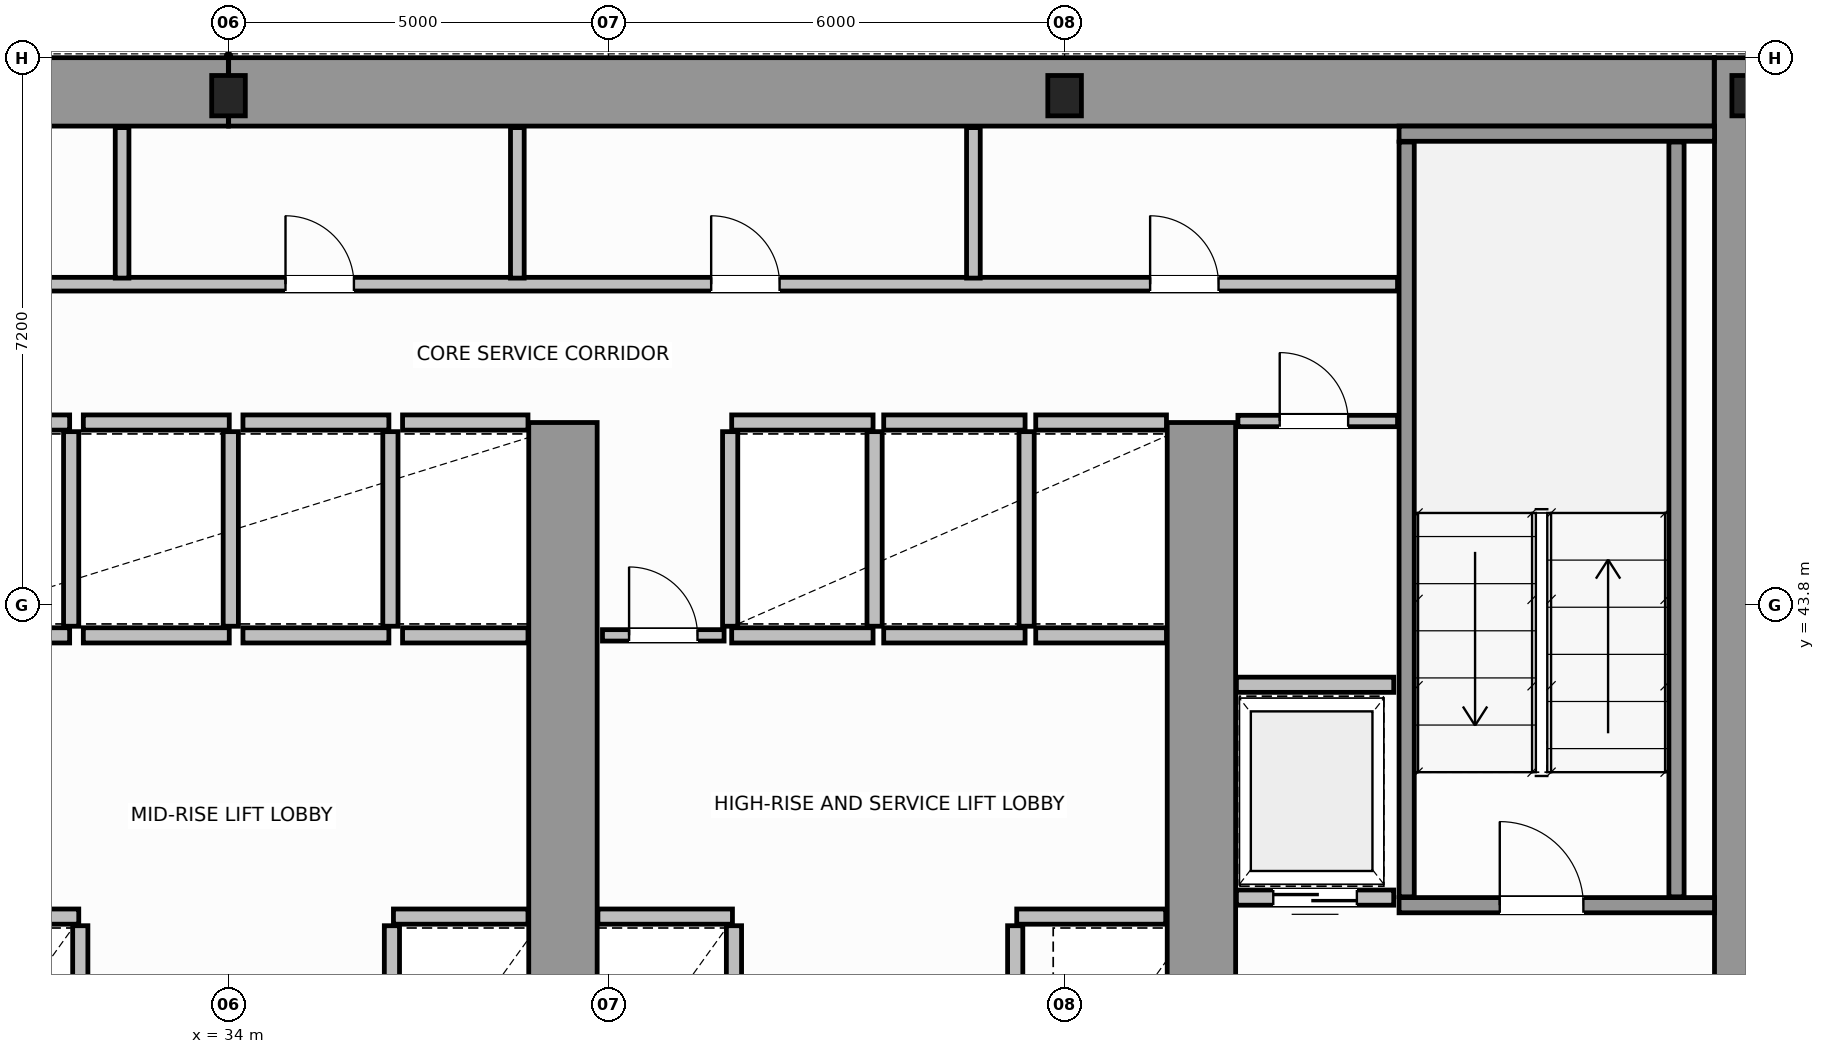
"""IFC4 building model, lengths in metres.
Left out: names, types, materials, properties, quantities, classifications, styles, units other than length and angle.
Written with IfcOpenShell. Run it as: python <this file> out.ifc"""

import sys

from ifc_helpers import new_model, si_unit, direction, frame, frame_2d, origin, origin_2d, place, context, subcontext, project, spatial, rectangle, i_section, extrude, source, transform, mapped, element, fill, save


model = new_model("IFC4")
c1 = context("Model", 3, precision=1e-05, world=origin(), true_north=direction((0.0, 1.0)))
c2 = subcontext(c1, "Body", "Model", "MODEL_VIEW")
j1 = project(units=[si_unit("LENGTHUNIT", "METRE"), si_unit("PLANEANGLEUNIT", "RADIAN")], contexts=[c1])
p1 = place(None, origin())
s1 = spatial("IfcSite", under=j1, at=p1, CompositionType="ELEMENT")
p2 = place(p1, origin())
s2 = spatial("IfcBuilding", under=s1, at=p2, CompositionType="ELEMENT")
p3 = place(p2, frame((0.0, 0.0, 79.6)))
s3 = spatial("IfcBuildingStorey", under=s2, at=p3, CompositionType="ELEMENT", Elevation=79.6)
m1 = source(origin(), c2, "Body", "SweptSolid", [
    extrude(i_section(OverallWidth=0.442, OverallDepth=0.531, WebThickness=0.065, FlangeThickness=0.076, FilletRadius=0.015, at=origin_2d()), origin(), (0.0, 0.0, 1.0), 3.8),
])
for number, where, z_axis, x_axis in (
    (1, (34.0, 50.5, 0.0), (0.0, 0.0, 1.0), (1.0, 0.0, 0.0)),
    (2, (45.0, 50.5, 0.0), (0.0, 0.0, 1.0), (1.0, 0.0, 0.0)),
    (3, (54.0, 50.5, 0.0), (0.0, 0.0, 1.0), (1.0, 0.0, 0.0)),
):
    element("IfcColumn", number, at=place(p3, frame(where, z_axis=z_axis, x_axis=x_axis)), inside=s3, PredefinedType="COLUMN", context=c2, shape_type="MappedRepresentation", body=[
        mapped(m1, transform((0.0, 0.0, 0.0), scale=1.0)),
    ])
for number, where, z_axis, x_axis in (
    (4, (14.454, 50.55, 0.0), (0.0, 0.0, 1.0), (1.0, 0.0, 0.0)),
    (5, (34.002, 50.55, 0.0), (0.0, 0.0, 1.0), (1.0, 0.0, 0.0)),
):
    element("IfcWall", number, at=place(p3, frame(where, z_axis=z_axis, x_axis=x_axis)), inside=s3, PredefinedType="SHEAR", context=c2, shape_type="SweptSolid", body=[
        extrude(rectangle(XDim=19.544, YDim=0.9, at=frame_2d((9.772, 0.0))), origin(), (0.0, 0.0, 1.0), 3.8),
    ])
p4 = place(p3, frame((54.0, 36.5, 0.0), z_axis=(0.0, 0.0, 1.0), x_axis=(0.0, 1.0, 0.0)))
e6 = element("IfcWall", 6, at=p4, inside=s3, PredefinedType="SHEAR", context=c2, shape_type="SweptSolid", body=[
    extrude(rectangle(XDim=14.5, YDim=0.9, at=frame_2d((7.25, 0.0))), origin(), (0.0, 0.0, 1.0), 3.8),
])
for number, where, z_axis, x_axis in (
    (7, (38.4, 36.97, 0.0), (0.0, 0.0, 1.0), (0.0, 1.0, 0.0)),
    (8, (46.8, 36.97, 0.0), (0.0, 0.0, 1.0), (0.0, 1.0, 0.0)),
):
    element("IfcWall", number, at=place(p3, frame(where, z_axis=z_axis, x_axis=x_axis)), inside=s3, PredefinedType="SHEAR", context=c2, shape_type="SweptSolid", body=[
        extrude(rectangle(XDim=9.23, YDim=0.9, at=frame_2d((4.615, 0.0))), origin(), (0.0, 0.0, 1.0), 3.8),
    ])
p5 = place(p3, frame((49.4, 39.85, 0.0), z_axis=(0.0, 0.0, 1.0), x_axis=(1.0, 0.0, 0.0)))
e9 = element("IfcWall", 9, at=p5, inside=s3, PredefinedType="SOLIDWALL", context=c2, shape_type="SweptSolid", body=[
    extrude(rectangle(XDim=4.15, YDim=0.2, at=frame_2d((2.075, 0.0))), origin(), (0.0, 0.0, 1.0), 3.8),
])
p6 = place(p5, frame((1.325, 0.0, 0.0)))
e10 = element("IfcOpeningElement", 10, at=p6, cuts=e9, PredefinedType="OPENING", context=c2, shape_type="SweptSolid", body=[
    extrude(rectangle(XDim=1.1, YDim=2.15, at=frame_2d((0.55, 1.075))), frame((0.0, 0.11, 0.0), z_axis=(0.0, -1.0, 0.0), x_axis=(1.0, 0.0, 0.0)), (0.0, 0.0, 1.0), 0.22),
])
p7 = place(p3, frame((49.4, 50.0, 0.0), z_axis=(0.0, 0.0, 1.0), x_axis=(1.0, 0.0, 0.0)))
e11 = element("IfcWall", 11, at=p7, inside=s3, PredefinedType="SOLIDWALL", context=c2, shape_type="SweptSolid", body=[
    extrude(rectangle(XDim=4.15, YDim=0.2, at=frame_2d((2.075, 0.0))), origin(), (0.0, 0.0, 1.0), 3.8),
])
for number, where, z_axis, x_axis in (
    (12, (49.5, 39.96, 0.0), (0.0, 0.0, 1.0), (0.0, 1.0, 0.0)),
    (13, (53.05, 39.96, 0.0), (0.0, 0.0, 1.0), (0.0, 1.0, 0.0)),
):
    element("IfcWall", number, at=place(p3, frame(where, z_axis=z_axis, x_axis=x_axis)), inside=s3, PredefinedType="SOLIDWALL", context=c2, shape_type="SweptSolid", body=[
        extrude(rectangle(XDim=9.93, YDim=0.2, at=frame_2d((4.965, 0.0))), origin(), (0.0, 0.0, 1.0), 3.8),
    ])
p8 = place(p3, frame((30.26, 39.7, 0.0), z_axis=(0.0, 0.0, 1.0), x_axis=(1.0, 0.0, 0.0)))
e14 = element("IfcWall", 14, at=p8, inside=s3, PredefinedType="SOLIDWALL", context=c2, shape_type="SweptSolid", body=[
    extrude(rectangle(XDim=1.77, YDim=0.2, at=frame_2d((0.885, 0.0))), origin(), (0.0, 0.0, 1.0), 3.54),
])
p9 = place(p3, frame((32.05, 37.02, 0.0), z_axis=(0.0, 0.0, 1.0), x_axis=(0.0, 1.0, 0.0)))
e15 = element("IfcWall", 15, at=p9, inside=s3, PredefinedType="SOLIDWALL", context=c2, shape_type="SweptSolid", body=[
    extrude(rectangle(XDim=2.56, YDim=0.2, at=frame_2d((1.28, 0.0))), origin(), (0.0, 0.0, 1.0), 3.54),
])
p10 = place(p3, frame((36.17, 39.7, 0.0), z_axis=(0.0, 0.0, 1.0), x_axis=(1.0, 0.0, 0.0)))
e16 = element("IfcWall", 16, at=p10, inside=s3, PredefinedType="SOLIDWALL", context=c2, shape_type="SweptSolid", body=[
    extrude(rectangle(XDim=1.77, YDim=0.2, at=frame_2d((0.885, 0.0))), origin(), (0.0, 0.0, 1.0), 3.54),
])
p11 = place(p3, frame((36.15, 37.02, 0.0), z_axis=(0.0, 0.0, 1.0), x_axis=(0.0, 1.0, 0.0)))
e17 = element("IfcWall", 17, at=p11, inside=s3, PredefinedType="SOLIDWALL", context=c2, shape_type="SweptSolid", body=[
    extrude(rectangle(XDim=2.56, YDim=0.2, at=frame_2d((1.28, 0.0))), origin(), (0.0, 0.0, 1.0), 3.54),
])
for number, where, z_axis, x_axis in (
    (18, (30.26, 43.4, 0.0), (0.0, 0.0, 1.0), (1.0, 0.0, 0.0)),
    (19, (30.26, 46.2, 0.0), (0.0, 0.0, 1.0), (1.0, 0.0, 0.0)),
):
    element("IfcWall", number, at=place(p3, frame(where, z_axis=z_axis, x_axis=x_axis)), inside=s3, PredefinedType="SOLIDWALL", context=c2, shape_type="SweptSolid", body=[
        extrude(rectangle(XDim=1.65, YDim=0.2, at=frame_2d((0.825, 0.0))), origin(), (0.0, 0.0, 1.0), 3.54),
    ])
p12 = place(p3, frame((31.93, 43.52, 0.0), z_axis=(0.0, 0.0, 1.0), x_axis=(0.0, 1.0, 0.0)))
e20 = element("IfcWall", 20, at=p12, inside=s3, PredefinedType="SOLIDWALL", context=c2, shape_type="SweptSolid", body=[
    extrude(rectangle(XDim=2.56, YDim=0.2, at=frame_2d((1.28, 0.0))), origin(), (0.0, 0.0, 1.0), 3.54),
])
for number, where, z_axis, x_axis in (
    (21, (32.09, 43.4, 0.0), (0.0, 0.0, 1.0), (1.0, 0.0, 0.0)),
    (22, (32.09, 46.2, 0.0), (0.0, 0.0, 1.0), (1.0, 0.0, 0.0)),
):
    element("IfcWall", number, at=place(p3, frame(where, z_axis=z_axis, x_axis=x_axis)), inside=s3, PredefinedType="SOLIDWALL", context=c2, shape_type="SweptSolid", body=[
        extrude(rectangle(XDim=1.92, YDim=0.2, at=frame_2d((0.96, 0.0))), origin(), (0.0, 0.0, 1.0), 3.54),
    ])
p13 = place(p3, frame((34.03, 43.52, 0.0), z_axis=(0.0, 0.0, 1.0), x_axis=(0.0, 1.0, 0.0)))
e23 = element("IfcWall", 23, at=p13, inside=s3, PredefinedType="SOLIDWALL", context=c2, shape_type="SweptSolid", body=[
    extrude(rectangle(XDim=2.56, YDim=0.2, at=frame_2d((1.28, 0.0))), origin(), (0.0, 0.0, 1.0), 3.54),
])
for number, where, z_axis, x_axis in (
    (24, (34.19, 43.4, 0.0), (0.0, 0.0, 1.0), (1.0, 0.0, 0.0)),
    (25, (34.19, 46.2, 0.0), (0.0, 0.0, 1.0), (1.0, 0.0, 0.0)),
):
    element("IfcWall", number, at=place(p3, frame(where, z_axis=z_axis, x_axis=x_axis)), inside=s3, PredefinedType="SOLIDWALL", context=c2, shape_type="SweptSolid", body=[
        extrude(rectangle(XDim=1.92, YDim=0.2, at=frame_2d((0.96, 0.0))), origin(), (0.0, 0.0, 1.0), 3.54),
    ])
p14 = place(p3, frame((36.13, 43.52, 0.0), z_axis=(0.0, 0.0, 1.0), x_axis=(0.0, 1.0, 0.0)))
e26 = element("IfcWall", 26, at=p14, inside=s3, PredefinedType="SOLIDWALL", context=c2, shape_type="SweptSolid", body=[
    extrude(rectangle(XDim=2.56, YDim=0.2, at=frame_2d((1.28, 0.0))), origin(), (0.0, 0.0, 1.0), 3.54),
])
for number, where, z_axis, x_axis in (
    (27, (36.29, 43.4, 0.0), (0.0, 0.0, 1.0), (1.0, 0.0, 0.0)),
    (28, (36.29, 46.2, 0.0), (0.0, 0.0, 1.0), (1.0, 0.0, 0.0)),
):
    element("IfcWall", number, at=place(p3, frame(where, z_axis=z_axis, x_axis=x_axis)), inside=s3, PredefinedType="SOLIDWALL", context=c2, shape_type="SweptSolid", body=[
        extrude(rectangle(XDim=1.65, YDim=0.2, at=frame_2d((0.825, 0.0))), origin(), (0.0, 0.0, 1.0), 3.54),
    ])
p15 = place(p3, frame((38.86, 39.7, 0.0), z_axis=(0.0, 0.0, 1.0), x_axis=(1.0, 0.0, 0.0)))
e29 = element("IfcWall", 29, at=p15, inside=s3, PredefinedType="SOLIDWALL", context=c2, shape_type="SweptSolid", body=[
    extrude(rectangle(XDim=1.77, YDim=0.2, at=frame_2d((0.885, 0.0))), origin(), (0.0, 0.0, 1.0), 3.54),
])
p16 = place(p3, frame((40.65, 37.02, 0.0), z_axis=(0.0, 0.0, 1.0), x_axis=(0.0, 1.0, 0.0)))
e30 = element("IfcWall", 30, at=p16, inside=s3, PredefinedType="SOLIDWALL", context=c2, shape_type="SweptSolid", body=[
    extrude(rectangle(XDim=2.56, YDim=0.2, at=frame_2d((1.28, 0.0))), origin(), (0.0, 0.0, 1.0), 3.54),
])
p17 = place(p3, frame((44.37, 39.7, 0.0), z_axis=(0.0, 0.0, 1.0), x_axis=(1.0, 0.0, 0.0)))
e31 = element("IfcWall", 31, at=p17, inside=s3, PredefinedType="SOLIDWALL", context=c2, shape_type="SweptSolid", body=[
    extrude(rectangle(XDim=1.96, YDim=0.2, at=frame_2d((0.98, 0.0))), origin(), (0.0, 0.0, 1.0), 3.54),
])
p18 = place(p3, frame((44.35, 37.02, 0.0), z_axis=(0.0, 0.0, 1.0), x_axis=(0.0, 1.0, 0.0)))
e32 = element("IfcWall", 32, at=p18, inside=s3, PredefinedType="SOLIDWALL", context=c2, shape_type="SweptSolid", body=[
    extrude(rectangle(XDim=2.56, YDim=0.2, at=frame_2d((1.28, 0.0))), origin(), (0.0, 0.0, 1.0), 3.54),
])
for number, where, z_axis, x_axis in (
    (33, (40.62, 43.4, 0.0), (0.0, 0.0, 1.0), (1.0, 0.0, 0.0)),
    (34, (40.62, 46.2, 0.0), (0.0, 0.0, 1.0), (1.0, 0.0, 0.0)),
):
    element("IfcWall", number, at=place(p3, frame(where, z_axis=z_axis, x_axis=x_axis)), inside=s3, PredefinedType="SOLIDWALL", context=c2, shape_type="SweptSolid", body=[
        extrude(rectangle(XDim=1.86, YDim=0.2, at=frame_2d((0.93, 0.0))), origin(), (0.0, 0.0, 1.0), 3.54),
    ])
for number, where, z_axis, x_axis in (
    (35, (40.6, 43.52, 0.0), (0.0, 0.0, 1.0), (0.0, 1.0, 0.0)),
    (36, (42.5, 43.52, 0.0), (0.0, 0.0, 1.0), (0.0, 1.0, 0.0)),
):
    element("IfcWall", number, at=place(p3, frame(where, z_axis=z_axis, x_axis=x_axis)), inside=s3, PredefinedType="SOLIDWALL", context=c2, shape_type="SweptSolid", body=[
        extrude(rectangle(XDim=2.56, YDim=0.2, at=frame_2d((1.28, 0.0))), origin(), (0.0, 0.0, 1.0), 3.54),
    ])
for number, where, z_axis, x_axis in (
    (37, (42.62, 43.4, 0.0), (0.0, 0.0, 1.0), (1.0, 0.0, 0.0)),
    (38, (42.62, 46.2, 0.0), (0.0, 0.0, 1.0), (1.0, 0.0, 0.0)),
):
    element("IfcWall", number, at=place(p3, frame(where, z_axis=z_axis, x_axis=x_axis)), inside=s3, PredefinedType="SOLIDWALL", context=c2, shape_type="SweptSolid", body=[
        extrude(rectangle(XDim=1.86, YDim=0.2, at=frame_2d((0.93, 0.0))), origin(), (0.0, 0.0, 1.0), 3.54),
    ])
p19 = place(p3, frame((44.5, 43.52, 0.0), z_axis=(0.0, 0.0, 1.0), x_axis=(0.0, 1.0, 0.0)))
e39 = element("IfcWall", 39, at=p19, inside=s3, PredefinedType="SOLIDWALL", context=c2, shape_type="SweptSolid", body=[
    extrude(rectangle(XDim=2.56, YDim=0.2, at=frame_2d((1.28, 0.0))), origin(), (0.0, 0.0, 1.0), 3.54),
])
for number, where, z_axis, x_axis in (
    (40, (44.62, 43.4, 0.0), (0.0, 0.0, 1.0), (1.0, 0.0, 0.0)),
    (41, (44.62, 46.2, 0.0), (0.0, 0.0, 1.0), (1.0, 0.0, 0.0)),
):
    element("IfcWall", number, at=place(p3, frame(where, z_axis=z_axis, x_axis=x_axis)), inside=s3, PredefinedType="SOLIDWALL", context=c2, shape_type="SweptSolid", body=[
        extrude(rectangle(XDim=1.72, YDim=0.2, at=frame_2d((0.86, 0.0))), origin(), (0.0, 0.0, 1.0), 3.54),
    ])
p20 = place(p3, frame((47.26, 39.95, 0.0), z_axis=(0.0, 0.0, 1.0), x_axis=(1.0, 0.0, 0.0)))
e42 = element("IfcWall", 42, at=p20, inside=s3, PredefinedType="SOLIDWALL", context=c2, shape_type="SweptSolid", body=[
    extrude(rectangle(XDim=2.07, YDim=0.2, at=frame_2d((1.035, 0.0))), origin(), (0.0, 0.0, 1.0), 3.54),
])
p21 = place(p20, frame((0.485, 0.0, 0.0)))
e43 = element("IfcOpeningElement", 43, at=p21, cuts=e42, PredefinedType="OPENING", context=c2, shape_type="SweptSolid", body=[
    extrude(rectangle(XDim=1.1, YDim=2.15, at=frame_2d((0.55, 1.075))), frame((0.0, 0.11, 0.0), z_axis=(0.0, -1.0, 0.0), x_axis=(1.0, 0.0, 0.0)), (0.0, 0.0, 1.0), 0.22),
])
p22 = place(p3, frame((47.26, 42.75, 0.0), z_axis=(0.0, 0.0, 1.0), x_axis=(1.0, 0.0, 0.0)))
e44 = element("IfcWall", 44, at=p22, inside=s3, PredefinedType="SOLIDWALL", context=c2, shape_type="SweptSolid", body=[
    extrude(rectangle(XDim=2.07, YDim=0.2, at=frame_2d((1.035, 0.0))), origin(), (0.0, 0.0, 1.0), 3.54),
])
p23 = place(p3, frame((47.28, 46.22, 0.0), z_axis=(0.0, 0.0, 1.0), x_axis=(1.0, 0.0, 0.0)))
e45 = element("IfcWall", 45, at=p23, inside=s3, PredefinedType="PARTITIONING", context=c2, shape_type="SweptSolid", body=[
    extrude(rectangle(XDim=2.1, YDim=0.15, at=frame_2d((1.05, 0.0))), origin(), (0.0, 0.0, 1.0), 3.54),
])
p24 = place(p23, frame((0.55, 0.0, 0.0)))
e46 = element("IfcOpeningElement", 46, at=p24, cuts=e45, PredefinedType="OPENING", context=c2, shape_type="SweptSolid", body=[
    extrude(rectangle(XDim=0.9, YDim=2.1, at=frame_2d((0.45, 1.05))), frame((0.0, 0.085, 0.0), z_axis=(0.0, -1.0, 0.0), x_axis=(1.0, 0.0, 0.0)), (0.0, 0.0, 1.0), 0.17),
])
p25 = place(p3, frame((38.92, 43.4, 0.0), z_axis=(0.0, 0.0, 1.0), x_axis=(1.0, 0.0, 0.0)))
e47 = element("IfcWall", 47, at=p25, inside=s3, PredefinedType="PARTITIONING", context=c2, shape_type="SweptSolid", body=[
    extrude(rectangle(XDim=1.6, YDim=0.15, at=frame_2d((0.8, 0.0))), origin(), (0.0, 0.0, 1.0), 3.54),
])
p26 = place(p25, frame((0.35, 0.0, 0.0)))
e48 = element("IfcOpeningElement", 48, at=p26, cuts=e47, PredefinedType="OPENING", context=c2, shape_type="SweptSolid", body=[
    extrude(rectangle(XDim=0.9, YDim=2.1, at=frame_2d((0.45, 1.05))), frame((0.0, 0.085, 0.0), z_axis=(0.0, -1.0, 0.0), x_axis=(1.0, 0.0, 0.0)), (0.0, 0.0, 1.0), 0.17),
])
p27 = place(p3, frame((18.62, 48.02, 0.0), z_axis=(0.0, 0.0, 1.0), x_axis=(1.0, 0.0, 0.0)))
e49 = element("IfcWall", 49, at=p27, inside=s3, PredefinedType="PLUMBINGWALL", context=c2, shape_type="SweptSolid", body=[
    extrude(rectangle(XDim=30.76, YDim=0.18, at=frame_2d((15.38, 0.0))), origin(), (0.0, 0.0, 1.0), 3.54),
])
p28 = place(p27, frame((1.655, 0.0, 0.0)))
e50 = element("IfcOpeningElement", 50, at=p28, cuts=e49, PredefinedType="OPENING", context=c2, shape_type="SweptSolid", body=[
    extrude(rectangle(XDim=0.9, YDim=2.15, at=frame_2d((0.45, 1.075))), frame((0.0, 0.1, 0.0), z_axis=(0.0, -1.0, 0.0), x_axis=(1.0, 0.0, 0.0)), (0.0, 0.0, 1.0), 0.2),
])
p29 = place(p27, frame((6.03, 0.0, 0.0)))
e51 = element("IfcOpeningElement", 51, at=p29, cuts=e49, PredefinedType="OPENING", context=c2, shape_type="SweptSolid", body=[
    extrude(rectangle(XDim=0.9, YDim=2.15, at=frame_2d((0.45, 1.075))), frame((0.0, 0.1, 0.0), z_axis=(0.0, -1.0, 0.0), x_axis=(1.0, 0.0, 0.0)), (0.0, 0.0, 1.0), 0.2),
])
p30 = place(p27, frame((10.93, 0.0, 0.0)))
e52 = element("IfcOpeningElement", 52, at=p30, cuts=e49, PredefinedType="OPENING", context=c2, shape_type="SweptSolid", body=[
    extrude(rectangle(XDim=0.9, YDim=2.15, at=frame_2d((0.45, 1.075))), frame((0.0, 0.1, 0.0), z_axis=(0.0, -1.0, 0.0), x_axis=(1.0, 0.0, 0.0)), (0.0, 0.0, 1.0), 0.2),
])
p31 = place(p27, frame((16.13, 0.0, 0.0)))
e53 = element("IfcOpeningElement", 53, at=p31, cuts=e49, PredefinedType="OPENING", context=c2, shape_type="SweptSolid", body=[
    extrude(rectangle(XDim=0.9, YDim=2.15, at=frame_2d((0.45, 1.075))), frame((0.0, 0.1, 0.0), z_axis=(0.0, -1.0, 0.0), x_axis=(1.0, 0.0, 0.0)), (0.0, 0.0, 1.0), 0.2),
])
p32 = place(p27, frame((21.73, 0.0, 0.0)))
e54 = element("IfcOpeningElement", 54, at=p32, cuts=e49, PredefinedType="OPENING", context=c2, shape_type="SweptSolid", body=[
    extrude(rectangle(XDim=0.9, YDim=2.15, at=frame_2d((0.45, 1.075))), frame((0.0, 0.1, 0.0), z_axis=(0.0, -1.0, 0.0), x_axis=(1.0, 0.0, 0.0)), (0.0, 0.0, 1.0), 0.2),
])
p33 = place(p27, frame((27.505, 0.0, 0.0)))
e55 = element("IfcOpeningElement", 55, at=p33, cuts=e49, PredefinedType="OPENING", context=c2, shape_type="SweptSolid", body=[
    extrude(rectangle(XDim=0.9, YDim=2.15, at=frame_2d((0.45, 1.075))), frame((0.0, 0.1, 0.0), z_axis=(0.0, -1.0, 0.0), x_axis=(1.0, 0.0, 0.0)), (0.0, 0.0, 1.0), 0.2),
])
for number, where, z_axis, x_axis in (
    (56, (32.6, 48.1, 0.0), (0.0, 0.0, 1.0), (0.0, 1.0, 0.0)),
    (57, (37.8, 48.1, 0.0), (0.0, 0.0, 1.0), (0.0, 1.0, 0.0)),
    (58, (43.8, 48.1, 0.0), (0.0, 0.0, 1.0), (0.0, 1.0, 0.0)),
):
    element("IfcWall", number, at=place(p3, frame(where, z_axis=z_axis, x_axis=x_axis)), inside=s3, PredefinedType="PLUMBINGWALL", context=c2, shape_type="SweptSolid", body=[
        extrude(rectangle(XDim=1.98, YDim=0.18, at=frame_2d((0.99, 0.0))), origin(), (0.0, 0.0, 1.0), 3.54),
    ])
m2 = source(origin(), c2, "Body", "SweptSolid", [
    extrude(rectangle(XDim=1.1, YDim=2.15, at=frame_2d((0.55, 1.075))), frame((0.0, 0.025, 0.0), z_axis=(0.0, -1.0, 0.0), x_axis=(1.0, 0.0, 0.0)), (0.0, 0.0, 1.0), 0.05),
])
p34 = place(p6, origin())
e59 = element("IfcDoor", 59, at=p34, inside=s3, OperationType="SINGLE_SWING_RIGHT", PredefinedType="DOOR", context=c2, shape_type="MappedRepresentation", body=[
    mapped(m2, transform((0.0, 0.0, 0.0), scale=1.0)),
])
fill(e10, e59)
p35 = place(p21, origin())
e60 = element("IfcDoor", 60, at=p35, inside=s3, OperationType="DOUBLE_DOOR_SLIDING", PredefinedType="DOOR", context=c2, shape_type="MappedRepresentation", body=[
    mapped(m2, transform((0.0, 0.0, 0.0), scale=1.0)),
])
fill(e43, e60)
m3 = source(origin(), c2, "Body", "SweptSolid", [
    extrude(rectangle(XDim=0.9, YDim=2.1, at=frame_2d((0.45, 1.05))), frame((0.0, 0.025, 0.0), z_axis=(0.0, -1.0, 0.0), x_axis=(1.0, 0.0, 0.0)), (0.0, 0.0, 1.0), 0.05),
])
p36 = place(p24, origin())
e61 = element("IfcDoor", 61, at=p36, inside=s3, OperationType="SINGLE_SWING_RIGHT", PredefinedType="DOOR", context=c2, shape_type="MappedRepresentation", body=[
    mapped(m3, transform((0.0, 0.0, 0.0), scale=1.0)),
])
fill(e46, e61)
p37 = place(p26, origin())
e62 = element("IfcDoor", 62, at=p37, inside=s3, OperationType="SINGLE_SWING_LEFT", PredefinedType="DOOR", context=c2, shape_type="MappedRepresentation", body=[
    mapped(m3, transform((0.0, 0.0, 0.0), scale=1.0)),
])
fill(e48, e62)
m4 = source(origin(), c2, "Body", "SweptSolid", [
    extrude(rectangle(XDim=0.9, YDim=2.15, at=frame_2d((0.45, 1.075))), frame((0.0, 0.025, 0.0), z_axis=(0.0, -1.0, 0.0), x_axis=(1.0, 0.0, 0.0)), (0.0, 0.0, 1.0), 0.05),
])
p38 = place(p31, origin())
e63 = element("IfcDoor", 63, at=p38, inside=s3, OperationType="SINGLE_SWING_RIGHT", PredefinedType="DOOR", context=c2, shape_type="MappedRepresentation", body=[
    mapped(m4, transform((0.0, 0.0, 0.0), scale=1.0)),
])
fill(e53, e63)
p39 = place(p32, origin())
e64 = element("IfcDoor", 64, at=p39, inside=s3, OperationType="SINGLE_SWING_LEFT", PredefinedType="DOOR", context=c2, shape_type="MappedRepresentation", body=[
    mapped(m4, transform((0.0, 0.0, 0.0), scale=1.0)),
])
fill(e54, e64)
p40 = place(p33, origin())
e65 = element("IfcDoor", 65, at=p40, inside=s3, OperationType="SINGLE_SWING_RIGHT", PredefinedType="DOOR", context=c2, shape_type="MappedRepresentation", body=[
    mapped(m4, transform((0.0, 0.0, 0.0), scale=1.0)),
])
fill(e55, e65)
save(model, sys.argv[1])
